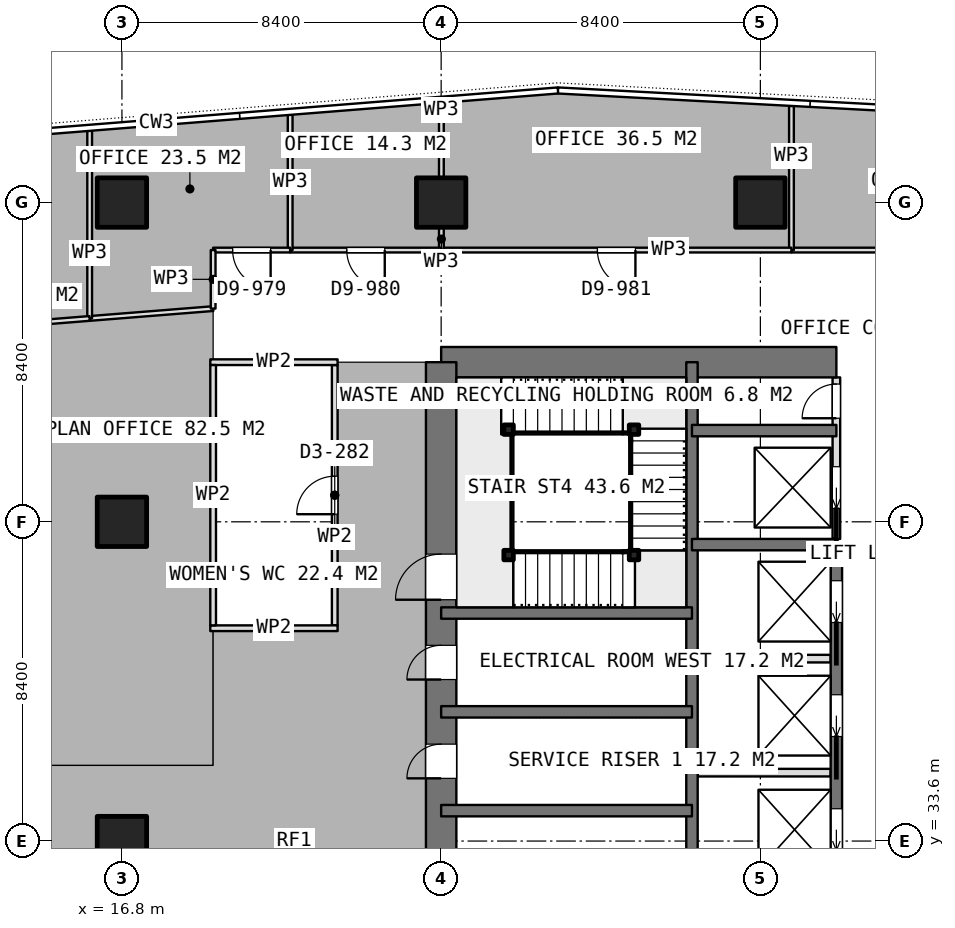
"""IFC4 building model, lengths in metres.
Left out: names, types, materials, properties, quantities, classifications, styles, units other than length and angle.
Written with IfcOpenShell. Run it as: python <this file> out.ifc"""

import sys

from ifc_helpers import new_model, si_unit, direction, frame, frame_2d, origin, origin_2d, place, context, subcontext, project, spatial, rectangle, extrude, element, fill, save


model = new_model("IFC4")
c1 = context("Model", 3, precision=1e-05, world=origin(), true_north=direction((0.0, 1.0)))
c2 = subcontext(c1, "Body", "Model", "MODEL_VIEW")
j1 = project(units=[si_unit("LENGTHUNIT", "METRE"), si_unit("PLANEANGLEUNIT", "RADIAN")], contexts=[c1])
p1 = place(None, origin())
s1 = spatial("IfcSite", under=j1, at=p1, CompositionType="ELEMENT")
p2 = place(p1, origin())
s2 = spatial("IfcBuilding", under=s1, at=p2, CompositionType="ELEMENT")
p3 = place(p2, frame((0.0, 0.0, 261.35)))
s3 = spatial("IfcBuildingStorey", under=s2, at=p3, CompositionType="ELEMENT", Elevation=261.35)
p4 = place(p3, frame((25.2, 46.2, 0.0), z_axis=(0.0, 0.0, 1.0), x_axis=(1.0, 0.0, 0.0)))
e1 = element("IfcWall", 1, at=p4, inside=s3, PredefinedType="SHEAR", context=c2, shape_type="SweptSolid", body=[
    extrude(rectangle(XDim=10.4, YDim=0.8, at=frame_2d((5.2, 0.0))), origin(), (0.0, 0.0, 1.0), 3.75),
])
p5 = place(p3, frame((25.2, 21.0, 0.0), z_axis=(0.0, 0.0, 1.0), x_axis=(0.0, 1.0, 0.0)))
e2 = element("IfcWall", 2, at=p5, inside=s3, PredefinedType="SHEAR", context=c2, shape_type="SweptSolid", body=[
    extrude(rectangle(XDim=25.2, YDim=0.8, at=frame_2d((12.6, 0.0))), origin(), (0.0, 0.0, 1.0), 3.75),
])
p6 = place(p5, frame((7.8, 0.0, 0.0)))
e3 = element("IfcOpeningElement", 3, at=p6, cuts=e2, PredefinedType="OPENING", context=c2, shape_type="SweptSolid", body=[
    extrude(rectangle(XDim=1.2, YDim=2.1, at=frame_2d((0.6, 1.05))), frame((0.0, 0.41, 0.0), z_axis=(0.0, -1.0, 0.0), x_axis=(1.0, 0.0, 0.0)), (0.0, 0.0, 1.0), 0.82),
])
p7 = place(p5, frame((14.25, 0.0, 0.0)))
e4 = element("IfcOpeningElement", 4, at=p7, cuts=e2, PredefinedType="OPENING", context=c2, shape_type="SweptSolid", body=[
    extrude(rectangle(XDim=0.9, YDim=2.1, at=frame_2d((0.45, 1.05))), frame((0.0, 0.41, 0.0), z_axis=(0.0, -1.0, 0.0), x_axis=(1.0, 0.0, 0.0)), (0.0, 0.0, 1.0), 0.82),
])
p8 = place(p5, frame((16.85, 0.0, 0.0)))
e5 = element("IfcOpeningElement", 5, at=p8, cuts=e2, PredefinedType="OPENING", context=c2, shape_type="SweptSolid", body=[
    extrude(rectangle(XDim=0.9, YDim=2.1, at=frame_2d((0.45, 1.05))), frame((0.0, 0.41, 0.0), z_axis=(0.0, -1.0, 0.0), x_axis=(1.0, 0.0, 0.0)), (0.0, 0.0, 1.0), 0.82),
])
p9 = place(p5, frame((18.95, 0.0, 0.0)))
e6 = element("IfcOpeningElement", 6, at=p9, cuts=e2, PredefinedType="OPENING", context=c2, shape_type="SweptSolid", body=[
    extrude(rectangle(XDim=1.2, YDim=2.1, at=frame_2d((0.6, 1.05))), frame((0.0, 0.41, 0.0), z_axis=(0.0, -1.0, 0.0), x_axis=(1.0, 0.0, 0.0)), (0.0, 0.0, 1.0), 0.82),
])
p10 = place(p3, frame((31.8, 21.0, 0.0), z_axis=(0.0, 0.0, 1.0), x_axis=(0.0, 1.0, 0.0)))
e7 = element("IfcWall", 7, at=p10, inside=s3, PredefinedType="SHEAR", context=c2, shape_type="SweptSolid", body=[
    extrude(rectangle(XDim=25.2, YDim=0.3, at=frame_2d((12.6, 0.0))), origin(), (0.0, 0.0, 1.0), 3.75),
])
p11 = place(p3, frame((35.6, 23.4, 0.0), z_axis=(0.0, 0.0, 1.0), x_axis=(0.0, 1.0, 0.0)))
e8 = element("IfcWall", 8, at=p11, inside=s3, PredefinedType="SHEAR", context=c2, shape_type="SweptSolid", body=[
    extrude(rectangle(XDim=18.0, YDim=0.3, at=frame_2d((9.0, 0.0))), origin(), (0.0, 0.0, 1.0), 3.75),
])
p12 = place(p11, frame((0.95, 0.0, 0.0)))
e9 = element("IfcOpeningElement", 9, at=p12, cuts=e8, PredefinedType="OPENING", context=c2, shape_type="SweptSolid", body=[
    extrude(rectangle(XDim=1.1, YDim=2.1, at=frame_2d((0.55, 1.05))), frame((0.0, 0.16, 0.0), z_axis=(0.0, -1.0, 0.0), x_axis=(1.0, 0.0, 0.0)), (0.0, 0.0, 1.0), 0.32),
])
p13 = place(p11, frame((3.95, 0.0, 0.0)))
e10 = element("IfcOpeningElement", 10, at=p13, cuts=e8, PredefinedType="OPENING", context=c2, shape_type="SweptSolid", body=[
    extrude(rectangle(XDim=1.1, YDim=2.1, at=frame_2d((0.55, 1.05))), frame((0.0, 0.16, 0.0), z_axis=(0.0, -1.0, 0.0), x_axis=(1.0, 0.0, 0.0)), (0.0, 0.0, 1.0), 0.32),
])
p14 = place(p11, frame((6.95, 0.0, 0.0)))
e11 = element("IfcOpeningElement", 11, at=p14, cuts=e8, PredefinedType="OPENING", context=c2, shape_type="SweptSolid", body=[
    extrude(rectangle(XDim=1.1, YDim=2.1, at=frame_2d((0.55, 1.05))), frame((0.0, 0.16, 0.0), z_axis=(0.0, -1.0, 0.0), x_axis=(1.0, 0.0, 0.0)), (0.0, 0.0, 1.0), 0.32),
])
p15 = place(p11, frame((9.95, 0.0, 0.0)))
e12 = element("IfcOpeningElement", 12, at=p15, cuts=e8, PredefinedType="OPENING", context=c2, shape_type="SweptSolid", body=[
    extrude(rectangle(XDim=1.1, YDim=2.1, at=frame_2d((0.55, 1.05))), frame((0.0, 0.16, 0.0), z_axis=(0.0, -1.0, 0.0), x_axis=(1.0, 0.0, 0.0)), (0.0, 0.0, 1.0), 0.32),
])
p16 = place(p11, frame((12.95, 0.0, 0.0)))
e13 = element("IfcOpeningElement", 13, at=p16, cuts=e8, PredefinedType="OPENING", context=c2, shape_type="SweptSolid", body=[
    extrude(rectangle(XDim=1.1, YDim=2.1, at=frame_2d((0.55, 1.05))), frame((0.0, 0.16, 0.0), z_axis=(0.0, -1.0, 0.0), x_axis=(1.0, 0.0, 0.0)), (0.0, 0.0, 1.0), 0.32),
])
p17 = place(p11, frame((15.95, 0.0, 0.0)))
e14 = element("IfcOpeningElement", 14, at=p17, cuts=e8, PredefinedType="OPENING", context=c2, shape_type="SweptSolid", body=[
    extrude(rectangle(XDim=1.1, YDim=2.1, at=frame_2d((0.55, 1.05))), frame((0.0, 0.16, 0.0), z_axis=(0.0, -1.0, 0.0), x_axis=(1.0, 0.0, 0.0)), (0.0, 0.0, 1.0), 0.32),
])
for number, where, z_axis, x_axis in (
    (15, (31.8, 41.4, 0.0), (0.0, 0.0, 1.0), (1.0, 0.0, 0.0)),
    (16, (31.8, 44.4, 0.0), (0.0, 0.0, 1.0), (1.0, 0.0, 0.0)),
):
    element("IfcWall", number, at=place(p3, frame(where, z_axis=z_axis, x_axis=x_axis)), inside=s3, PredefinedType="SHEAR", context=c2, shape_type="SweptSolid", body=[
        extrude(rectangle(XDim=3.8, YDim=0.3, at=frame_2d((1.9, 0.0))), origin(), (0.0, 0.0, 1.0), 3.75),
    ])
for number, where, z_axis, x_axis in (
    (17, (25.2, 34.4, 0.0), (0.0, 0.0, 1.0), (1.0, 0.0, 0.0)),
    (18, (25.2, 37.0, 0.0), (0.0, 0.0, 1.0), (1.0, 0.0, 0.0)),
    (19, (25.2, 39.6, 0.0), (0.0, 0.0, 1.0), (1.0, 0.0, 0.0)),
):
    element("IfcWall", number, at=place(p3, frame(where, z_axis=z_axis, x_axis=x_axis)), inside=s3, PredefinedType="SHEAR", context=c2, shape_type="SweptSolid", body=[
        extrude(rectangle(XDim=6.6, YDim=0.3, at=frame_2d((3.3, 0.0))), origin(), (0.0, 0.0, 1.0), 3.75),
    ])
for number, where, z_axis, x_axis in (
    (20, (16.8, 33.6, 0.0), (0.0, 0.0, 1.0), (1.0, 0.0, 0.0)),
    (21, (16.8, 42.0, 0.0), (0.0, 0.0, 1.0), (1.0, 0.0, 0.0)),
    (22, (16.8, 50.4, 0.0), (0.0, 0.0, 1.0), (1.0, 0.0, 0.0)),
    (23, (25.2, 50.4, 0.0), (0.0, 0.0, 1.0), (1.0, 0.0, 0.0)),
    (24, (33.6, 50.4, 0.0), (0.0, 0.0, 1.0), (1.0, 0.0, 0.0)),
):
    element("IfcColumn", number, at=place(p3, frame(where, z_axis=z_axis, x_axis=x_axis)), inside=s3, PredefinedType="COLUMN", context=c2, shape_type="SweptSolid", body=[
        extrude(rectangle(XDim=1.3, YDim=1.3, at=origin_2d()), origin(), (0.0, 0.0, 1.0), 3.75),
    ])
for number, where, z_axis, x_axis in (
    (25, (31.95, 35.4, 0.0), (0.0, 0.0, 1.0), (1.0, 0.0, 0.0)),
    (26, (31.95, 38.4, 0.0), (0.0, 0.0, 1.0), (1.0, 0.0, 0.0)),
):
    element("IfcWall", number, at=place(p3, frame(where, z_axis=z_axis, x_axis=x_axis)), inside=s3, PredefinedType="PARTITIONING", context=c2, shape_type="SweptSolid", body=[
        extrude(rectangle(XDim=3.5, YDim=0.2, at=frame_2d((1.75, 0.0))), origin(), (0.0, 0.0, 1.0), 3.5),
    ])
p18 = place(p3, frame((35.6, 41.55, 0.0), z_axis=(0.0, 0.0, 1.0), x_axis=(0.0, 1.0, 0.0)))
e27 = element("IfcWall", 27, at=p18, inside=s3, PredefinedType="PARTITIONING", context=c2, shape_type="SweptSolid", body=[
    extrude(rectangle(XDim=4.25, YDim=0.2, at=frame_2d((2.125, 0.0))), origin(), (0.0, 0.0, 1.0), 3.5),
])
p19 = place(p18, frame((3.175, 0.0, 0.0)))
e28 = element("IfcOpeningElement", 28, at=p19, cuts=e27, PredefinedType="OPENING", context=c2, shape_type="SweptSolid", body=[
    extrude(rectangle(XDim=0.9, YDim=2.1, at=frame_2d((0.45, 1.05))), frame((0.0, 0.11, 0.0), z_axis=(0.0, -1.0, 0.0), x_axis=(1.0, 0.0, 0.0)), (0.0, 0.0, 1.0), 0.22),
])
p20 = place(p18, frame((0.8, 0.0, 0.0)))
e29 = element("IfcOpeningElement", 29, at=p20, cuts=e27, PredefinedType="OPENING", context=c2, shape_type="SweptSolid", body=[
    extrude(rectangle(XDim=1.1, YDim=2.1, at=frame_2d((0.55, 1.05))), frame((0.0, 0.11, 0.0), z_axis=(0.0, -1.0, 0.0), x_axis=(1.0, 0.0, 0.0)), (0.0, 0.0, 1.0), 0.22),
])
for number, where, z_axis, x_axis in (
    (30, (19.125, 39.2, 0.0), (0.0, 0.0, 1.0), (1.0, 0.0, 0.0)),
    (31, (19.125, 46.2, 0.0), (0.0, 0.0, 1.0), (1.0, 0.0, 0.0)),
):
    element("IfcWall", number, at=place(p3, frame(where, z_axis=z_axis, x_axis=x_axis)), inside=s3, PredefinedType="PARTITIONING", context=c2, shape_type="SweptSolid", body=[
        extrude(rectangle(XDim=3.35, YDim=0.15, at=frame_2d((1.675, 0.0))), origin(), (0.0, 0.0, 1.0), 3.5),
    ])
p21 = place(p3, frame((19.2, 39.275, 0.0), z_axis=(0.0, 0.0, 1.0), x_axis=(0.0, 1.0, 0.0)))
e32 = element("IfcWall", 32, at=p21, inside=s3, PredefinedType="PARTITIONING", context=c2, shape_type="SweptSolid", body=[
    extrude(rectangle(XDim=6.85, YDim=0.15, at=frame_2d((3.425, 0.0))), origin(), (0.0, 0.0, 1.0), 3.5),
])
p22 = place(p3, frame((22.4, 39.275, 0.0), z_axis=(0.0, 0.0, 1.0), x_axis=(0.0, 1.0, 0.0)))
e33 = element("IfcWall", 33, at=p22, inside=s3, PredefinedType="PARTITIONING", context=c2, shape_type="SweptSolid", body=[
    extrude(rectangle(XDim=6.85, YDim=0.15, at=frame_2d((3.425, 0.0))), origin(), (0.0, 0.0, 1.0), 3.5),
])
p23 = place(p22, frame((2.925, 0.0, 0.0)))
e34 = element("IfcOpeningElement", 34, at=p23, cuts=e33, PredefinedType="OPENING", context=c2, shape_type="SweptSolid", body=[
    extrude(rectangle(XDim=1.0, YDim=2.1, at=frame_2d((0.5, 1.05))), frame((0.0, 0.085, 0.0), z_axis=(0.0, -1.0, 0.0), x_axis=(1.0, 0.0, 0.0)), (0.0, 0.0, 1.0), 0.17),
])
p24 = place(p3, frame((42.889, 49.15, 0.0), z_axis=(0.0, 0.0, 1.0), x_axis=(-1.0, 0.0, 0.0)))
e35 = element("IfcWall", 35, at=p24, inside=s3, PredefinedType="PARTITIONING", context=c2, shape_type="SweptSolid", body=[
    extrude(rectangle(XDim=8.471, YDim=0.125, at=frame_2d((4.235, 0.0))), origin(), (0.0, 0.0, 1.0), 3.5),
])
p25 = place(p24, frame((3.736, 0.0, 0.0)))
e36 = element("IfcOpeningElement", 36, at=p25, cuts=e35, PredefinedType="OPENING", context=c2, shape_type="SweptSolid", body=[
    extrude(rectangle(XDim=1.0, YDim=2.1, at=frame_2d((0.5, 1.05))), frame((0.0, 0.073, 0.0), z_axis=(0.0, -1.0, 0.0), x_axis=(1.0, 0.0, 0.0)), (0.0, 0.0, 1.0), 0.145),
])
p26 = place(p3, frame((34.418, 49.15, 0.0), z_axis=(0.0, 0.0, 1.0), x_axis=(0.0, 1.0, 0.0)))
e37 = element("IfcWall", 37, at=p26, inside=s3, PredefinedType="PARTITIONING", context=c2, shape_type="SweptSolid", body=[
    extrude(rectangle(XDim=3.793, YDim=0.125, at=frame_2d((1.896, 0.0))), origin(), (0.0, 0.0, 1.0), 3.5),
])
p27 = place(p3, frame((34.417, 49.15, 0.0), z_axis=(0.0, 0.0, 1.0), x_axis=(-1.0, 0.0, 0.0)))
e38 = element("IfcWall", 38, at=p27, inside=s3, PredefinedType="PARTITIONING", context=c2, shape_type="SweptSolid", body=[
    extrude(rectangle(XDim=9.211, YDim=0.125, at=frame_2d((4.605, 0.0))), origin(), (0.0, 0.0, 1.0), 3.5),
])
p28 = place(p27, frame((4.105, 0.0, 0.0)))
e39 = element("IfcOpeningElement", 39, at=p28, cuts=e38, PredefinedType="OPENING", context=c2, shape_type="SweptSolid", body=[
    extrude(rectangle(XDim=1.0, YDim=2.1, at=frame_2d((0.5, 1.05))), frame((0.0, 0.073, 0.0), z_axis=(0.0, -1.0, 0.0), x_axis=(1.0, 0.0, 0.0)), (0.0, 0.0, 1.0), 0.145),
])
p29 = place(p3, frame((25.206, 49.15, 0.0), z_axis=(0.0, 0.0, 1.0), x_axis=(0.0, 1.0, 0.0)))
e40 = element("IfcWall", 40, at=p29, inside=s3, PredefinedType="PARTITIONING", context=c2, shape_type="SweptSolid", body=[
    extrude(rectangle(XDim=0.58, YDim=0.125, at=frame_2d((0.29, 0.0))), origin(), (0.0, 0.0, 1.0), 3.5),
])
p30 = place(p3, frame((25.206, 51.07, 0.0), z_axis=(0.0, 0.0, 1.0), x_axis=(0.0, 1.0, 0.0)))
e41 = element("IfcWall", 41, at=p30, inside=s3, PredefinedType="PARTITIONING", context=c2, shape_type="SweptSolid", body=[
    extrude(rectangle(XDim=1.955, YDim=0.125, at=frame_2d((0.978, 0.0))), origin(), (0.0, 0.0, 1.0), 3.5),
])
p31 = place(p3, frame((25.205, 49.15, 0.0), z_axis=(0.0, 0.0, 1.0), x_axis=(-1.0, 0.0, 0.0)))
e42 = element("IfcWall", 42, at=p31, inside=s3, PredefinedType="PARTITIONING", context=c2, shape_type="SweptSolid", body=[
    extrude(rectangle(XDim=3.978, YDim=0.125, at=frame_2d((1.989, 0.0))), origin(), (0.0, 0.0, 1.0), 3.5),
])
p32 = place(p31, frame((1.489, 0.0, 0.0)))
e43 = element("IfcOpeningElement", 43, at=p32, cuts=e42, PredefinedType="OPENING", context=c2, shape_type="SweptSolid", body=[
    extrude(rectangle(XDim=1.0, YDim=2.1, at=frame_2d((0.5, 1.05))), frame((0.0, 0.073, 0.0), z_axis=(0.0, -1.0, 0.0), x_axis=(1.0, 0.0, 0.0)), (0.0, 0.0, 1.0), 0.145),
])
p33 = place(p3, frame((21.227, 49.15, 0.0), z_axis=(0.0, 0.0, 1.0), x_axis=(0.0, 1.0, 0.0)))
e44 = element("IfcWall", 44, at=p33, inside=s3, PredefinedType="PARTITIONING", context=c2, shape_type="SweptSolid", body=[
    extrude(rectangle(XDim=3.558, YDim=0.125, at=frame_2d((1.779, 0.0))), origin(), (0.0, 0.0, 1.0), 3.5),
])
p34 = place(p3, frame((19.2, 47.61, 0.0), z_axis=(0.0, 0.0, 1.0), x_axis=(-0.99683691537, -0.079474298708, 0.0)))
e45 = element("IfcWall", 45, at=p34, inside=s3, PredefinedType="PARTITIONING", context=c2, shape_type="SweptSolid", body=[
    extrude(rectangle(XDim=3.259, YDim=0.125, at=frame_2d((1.63, 0.0))), origin(), (0.0, 0.0, 1.0), 3.5),
])
p35 = place(p3, frame((15.951, 47.351, 0.0), z_axis=(0.0, 0.0, 1.0), x_axis=(0.0, 1.0, 0.0)))
e46 = element("IfcWall", 46, at=p35, inside=s3, PredefinedType="PARTITIONING", context=c2, shape_type="SweptSolid", body=[
    extrude(rectangle(XDim=4.936, YDim=0.125, at=frame_2d((2.468, 0.0))), origin(), (0.0, 0.0, 1.0), 3.5),
])
p36 = place(p3, frame((21.226, 49.15, 0.0), z_axis=(0.0, 0.0, 1.0), x_axis=(-1.0, 0.0, 0.0)))
e47 = element("IfcWall", 47, at=p36, inside=s3, PredefinedType="PARTITIONING", context=c2, shape_type="SweptSolid", body=[
    extrude(rectangle(XDim=2.026, YDim=0.125, at=frame_2d((1.013, 0.0))), origin(), (0.0, 0.0, 1.0), 3.5),
])
p37 = place(p36, frame((0.513, 0.0, 0.0)))
e48 = element("IfcOpeningElement", 48, at=p37, cuts=e47, PredefinedType="OPENING", context=c2, shape_type="SweptSolid", body=[
    extrude(rectangle(XDim=1.0, YDim=2.1, at=frame_2d((0.5, 1.05))), frame((0.0, 0.073, 0.0), z_axis=(0.0, -1.0, 0.0), x_axis=(1.0, 0.0, 0.0)), (0.0, 0.0, 1.0), 0.145),
])
p38 = place(p3, frame((19.2, 49.15, 0.0), z_axis=(0.0, 0.0, 1.0), x_axis=(0.0, -1.0, 0.0)))
e49 = element("IfcWall", 49, at=p38, inside=s3, PredefinedType="PARTITIONING", context=c2, shape_type="SweptSolid", body=[
    extrude(rectangle(XDim=1.54, YDim=0.125, at=frame_2d((0.77, 0.0))), origin(), (0.0, 0.0, 1.0), 3.5),
])
p39 = place(p3, frame((15.95, 47.351, 0.0), z_axis=(0.0, 0.0, 1.0), x_axis=(-0.99682463174, -0.07962822086, 0.0)))
e50 = element("IfcWall", 50, at=p39, inside=s3, PredefinedType="PARTITIONING", context=c2, shape_type="SweptSolid", body=[
    extrude(rectangle(XDim=3.317, YDim=0.125, at=frame_2d((1.659, 0.0))), origin(), (0.0, 0.0, 1.0), 3.5),
])
for number, where, z_axis, x_axis in (
    (51, (26.975, 41.125, 0.0), (0.0, 0.0, 1.0), (1.0, 0.0, 0.0)),
    (52, (30.275, 41.125, 0.0), (0.0, 0.0, 1.0), (1.0, 0.0, 0.0)),
    (53, (30.275, 44.425, 0.0), (0.0, 0.0, 1.0), (1.0, 0.0, 0.0)),
    (54, (26.975, 44.425, 0.0), (0.0, 0.0, 1.0), (1.0, 0.0, 0.0)),
):
    element("IfcColumn", number, at=place(p3, frame(where, z_axis=z_axis, x_axis=x_axis)), inside=s3, PredefinedType="COLUMN", context=c2, shape_type="SweptSolid", body=[
        extrude(rectangle(XDim=0.25, YDim=0.25, at=origin_2d()), origin(), (0.0, 0.0, 1.0), 3.75),
    ])
p40 = place(p7, origin())
e55 = element("IfcDoor", 55, at=p40, inside=s3, OperationType="SINGLE_SWING_LEFT", PredefinedType="DOOR", context=c2, shape_type="SweptSolid", body=[
    extrude(rectangle(XDim=0.9, YDim=2.1, at=frame_2d((0.45, 1.05))), frame((0.0, 0.025, 0.0), z_axis=(0.0, -1.0, 0.0), x_axis=(1.0, 0.0, 0.0)), (0.0, 0.0, 1.0), 0.05),
])
fill(e4, e55)
p41 = place(p8, origin())
e56 = element("IfcDoor", 56, at=p41, inside=s3, OperationType="SINGLE_SWING_LEFT", PredefinedType="DOOR", context=c2, shape_type="SweptSolid", body=[
    extrude(rectangle(XDim=0.9, YDim=2.1, at=frame_2d((0.45, 1.05))), frame((0.0, 0.025, 0.0), z_axis=(0.0, -1.0, 0.0), x_axis=(1.0, 0.0, 0.0)), (0.0, 0.0, 1.0), 0.05),
])
fill(e5, e56)
p42 = place(p19, origin())
e57 = element("IfcDoor", 57, at=p42, inside=s3, OperationType="SINGLE_SWING_LEFT", PredefinedType="DOOR", context=c2, shape_type="SweptSolid", body=[
    extrude(rectangle(XDim=0.9, YDim=2.1, at=frame_2d((0.45, 1.05))), frame((0.0, 0.025, 0.0), z_axis=(0.0, -1.0, 0.0), x_axis=(1.0, 0.0, 0.0)), (0.0, 0.0, 1.0), 0.05),
])
fill(e28, e57)
p43 = place(p15, origin())
e58 = element("IfcDoor", 58, at=p43, inside=s3, OperationType="SLIDING_TO_LEFT", PredefinedType="USERDEFINED", context=c2, shape_type="SweptSolid", body=[
    extrude(rectangle(XDim=1.1, YDim=2.1, at=frame_2d((0.55, 1.05))), frame((0.0, 0.025, 0.0), z_axis=(0.0, -1.0, 0.0), x_axis=(1.0, 0.0, 0.0)), (0.0, 0.0, 1.0), 0.05),
])
fill(e12, e58)
p44 = place(p16, origin())
e59 = element("IfcDoor", 59, at=p44, inside=s3, OperationType="SLIDING_TO_LEFT", PredefinedType="USERDEFINED", context=c2, shape_type="SweptSolid", body=[
    extrude(rectangle(XDim=1.1, YDim=2.1, at=frame_2d((0.55, 1.05))), frame((0.0, 0.025, 0.0), z_axis=(0.0, -1.0, 0.0), x_axis=(1.0, 0.0, 0.0)), (0.0, 0.0, 1.0), 0.05),
])
fill(e13, e59)
p45 = place(p17, origin())
e60 = element("IfcDoor", 60, at=p45, inside=s3, OperationType="SLIDING_TO_LEFT", PredefinedType="USERDEFINED", context=c2, shape_type="SweptSolid", body=[
    extrude(rectangle(XDim=1.1, YDim=2.1, at=frame_2d((0.55, 1.05))), frame((0.0, 0.025, 0.0), z_axis=(0.0, -1.0, 0.0), x_axis=(1.0, 0.0, 0.0)), (0.0, 0.0, 1.0), 0.05),
])
fill(e14, e60)
p46 = place(p20, origin())
e61 = element("IfcDoor", 61, at=p46, inside=s3, OperationType="SLIDING_TO_LEFT", PredefinedType="USERDEFINED", context=c2, shape_type="SweptSolid", body=[
    extrude(rectangle(XDim=1.1, YDim=2.1, at=frame_2d((0.55, 1.05))), frame((0.0, 0.025, 0.0), z_axis=(0.0, -1.0, 0.0), x_axis=(1.0, 0.0, 0.0)), (0.0, 0.0, 1.0), 0.05),
])
fill(e29, e61)
p47 = place(p23, origin())
e62 = element("IfcDoor", 62, at=p47, inside=s3, OperationType="SINGLE_SWING_LEFT", PredefinedType="DOOR", context=c2, shape_type="SweptSolid", body=[
    extrude(rectangle(XDim=1.0, YDim=2.1, at=frame_2d((0.5, 1.05))), frame((0.0, 0.025, 0.0), z_axis=(0.0, -1.0, 0.0), x_axis=(1.0, 0.0, 0.0)), (0.0, 0.0, 1.0), 0.05),
])
fill(e34, e62)
p48 = place(p28, origin())
e63 = element("IfcDoor", 63, at=p48, inside=s3, OperationType="SINGLE_SWING_LEFT", PredefinedType="DOOR", context=c2, shape_type="SweptSolid", body=[
    extrude(rectangle(XDim=1.0, YDim=2.1, at=frame_2d((0.5, 1.05))), frame((0.0, 0.025, 0.0), z_axis=(0.0, -1.0, 0.0), x_axis=(1.0, 0.0, 0.0)), (0.0, 0.0, 1.0), 0.05),
])
fill(e39, e63)
p49 = place(p32, origin())
e64 = element("IfcDoor", 64, at=p49, inside=s3, OperationType="SINGLE_SWING_LEFT", PredefinedType="DOOR", context=c2, shape_type="SweptSolid", body=[
    extrude(rectangle(XDim=1.0, YDim=2.1, at=frame_2d((0.5, 1.05))), frame((0.0, 0.025, 0.0), z_axis=(0.0, -1.0, 0.0), x_axis=(1.0, 0.0, 0.0)), (0.0, 0.0, 1.0), 0.05),
])
fill(e43, e64)
p50 = place(p37, origin())
e65 = element("IfcDoor", 65, at=p50, inside=s3, OperationType="SINGLE_SWING_LEFT", PredefinedType="DOOR", context=c2, shape_type="SweptSolid", body=[
    extrude(rectangle(XDim=1.0, YDim=2.1, at=frame_2d((0.5, 1.05))), frame((0.0, 0.025, 0.0), z_axis=(0.0, -1.0, 0.0), x_axis=(1.0, 0.0, 0.0)), (0.0, 0.0, 1.0), 0.05),
])
fill(e48, e65)
p51 = place(p9, origin())
e66 = element("IfcDoor", 66, at=p51, inside=s3, OperationType="SINGLE_SWING_RIGHT", PredefinedType="DOOR", context=c2, shape_type="SweptSolid", body=[
    extrude(rectangle(XDim=1.2, YDim=2.1, at=frame_2d((0.6, 1.05))), frame((0.0, 0.025, 0.0), z_axis=(0.0, -1.0, 0.0), x_axis=(1.0, 0.0, 0.0)), (0.0, 0.0, 1.0), 0.05),
])
fill(e6, e66)
save(model, sys.argv[1])
